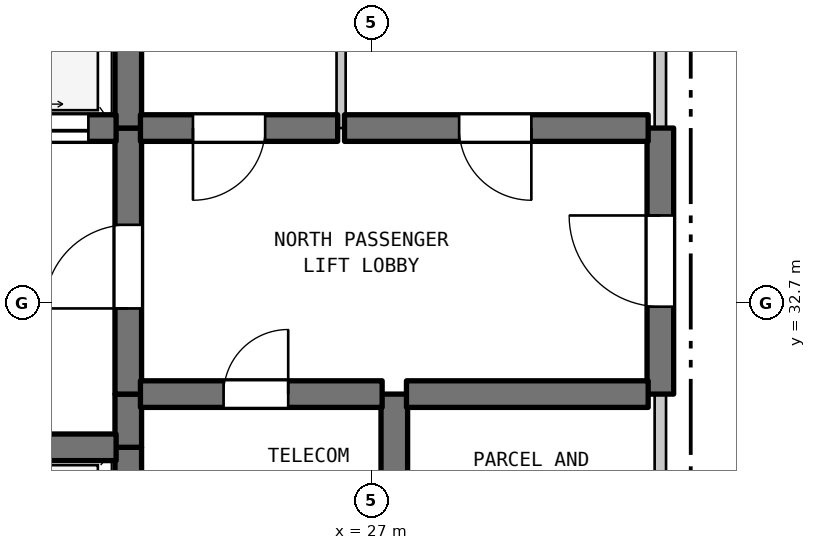
"""IFC4 building model, lengths in metres.
Left out: names, types, materials, properties, quantities, classifications, styles, units other than length and angle.
Written with IfcOpenShell. Run it as: python <this file> out.ifc"""

import sys

from ifc_helpers import new_model, si_unit, direction, frame, frame_2d, origin, place, context, subcontext, project, spatial, rectangle, extrude, element, fill, save


model = new_model("IFC4")
c1 = context("Model", 3, precision=1e-05, world=origin(), true_north=direction((0.0, 1.0)))
c2 = subcontext(c1, "Body", "Model", "MODEL_VIEW")
j1 = project(units=[si_unit("LENGTHUNIT", "METRE"), si_unit("PLANEANGLEUNIT", "RADIAN")], contexts=[c1])
p1 = place(None, origin())
s1 = spatial("IfcSite", under=j1, at=p1, CompositionType="ELEMENT")
p2 = place(p1, origin())
s2 = spatial("IfcBuilding", under=s1, at=p2, CompositionType="ELEMENT")
p3 = place(p2, frame((0.0, 0.0, 262.1)))
s3 = spatial("IfcBuildingStorey", under=s2, at=p3, CompositionType="ELEMENT", Elevation=262.1)
p4 = place(p3, frame((23.8, 28.2, 0.0), z_axis=(0.0, 0.0, 1.0), x_axis=(0.0, 1.0, 0.0)))
e1 = element("IfcWall", 1, at=p4, inside=s3, PredefinedType="SHEAR", context=c2, shape_type="SweptSolid", body=[
    extrude(rectangle(XDim=2.6, YDim=0.35, at=frame_2d((1.3, 0.0))), origin(), (0.0, 0.0, 1.0), 3.39),
])
p5 = place(p3, frame((23.8, 30.8, 0.0), z_axis=(0.0, 0.0, 1.0), x_axis=(0.0, 1.0, 0.0)))
e2 = element("IfcWall", 2, at=p5, inside=s3, PredefinedType="SHEAR", context=c2, shape_type="SweptSolid", body=[
    extrude(rectangle(XDim=0.7, YDim=0.35, at=frame_2d((0.35, 0.0))), origin(), (0.0, 0.0, 1.0), 3.39),
])
p6 = place(p3, frame((23.8, 31.5, 0.0), z_axis=(0.0, 0.0, 1.0), x_axis=(0.0, 1.0, 0.0)))
e3 = element("IfcWall", 3, at=p6, inside=s3, PredefinedType="SHEAR", context=c2, shape_type="SweptSolid", body=[
    extrude(rectangle(XDim=3.5, YDim=0.35, at=frame_2d((1.75, 0.0))), origin(), (0.0, 0.0, 1.0), 3.39),
])
p7 = place(p6, frame((1.127, 0.0, 0.0)))
e4 = element("IfcOpeningElement", 4, at=p7, cuts=e3, PredefinedType="OPENING", context=c2, shape_type="SweptSolid", body=[
    extrude(rectangle(XDim=1.1, YDim=2.15, at=frame_2d((0.55, 1.075))), frame((0.0, 0.185, 0.0), z_axis=(0.0, -1.0, 0.0), x_axis=(1.0, 0.0, 0.0)), (0.0, 0.0, 1.0), 0.37),
])
p8 = place(p3, frame((23.8, 35.0, 0.0), z_axis=(0.0, 0.0, 1.0), x_axis=(0.0, 1.0, 0.0)))
e5 = element("IfcWall", 5, at=p8, inside=s3, PredefinedType="SHEAR", context=c2, shape_type="SweptSolid", body=[
    extrude(rectangle(XDim=2.9, YDim=0.35, at=frame_2d((1.45, 0.0))), origin(), (0.0, 0.0, 1.0), 3.39),
])
p9 = place(p3, frame((26.6, 35.0, 0.0), z_axis=(0.0, 0.0, 1.0), x_axis=(0.0, 1.0, 0.0)))
e6 = element("IfcWall", 6, at=p9, inside=s3, PredefinedType="PARTITIONING", context=c2, shape_type="SweptSolid", body=[
    extrude(rectangle(XDim=2.9, YDim=0.12, at=frame_2d((1.45, 0.0))), origin(), (0.0, 0.0, 1.0), 3.39),
])
p10 = place(p3, frame((27.3, 28.9, 0.0), z_axis=(0.0, 0.0, 1.0), x_axis=(0.0, 1.0, 0.0)))
e7 = element("IfcWall", 7, at=p10, inside=s3, PredefinedType="SHEAR", context=c2, shape_type="SweptSolid", body=[
    extrude(rectangle(XDim=2.6, YDim=0.35, at=frame_2d((1.3, 0.0))), origin(), (0.0, 0.0, 1.0), 3.39),
])
p11 = place(p3, frame((30.8, 28.9, 0.0), z_axis=(0.0, 0.0, 1.0), x_axis=(0.0, 1.0, 0.0)))
e8 = element("IfcWall", 8, at=p11, inside=s3, PredefinedType="STANDARD", context=c2, shape_type="SweptSolid", body=[
    extrude(rectangle(XDim=2.6, YDim=0.15, at=frame_2d((1.3, 0.0))), origin(), (0.0, 0.0, 1.0), 3.39),
])
p12 = place(p3, frame((30.8, 31.5, 0.0), z_axis=(0.0, 0.0, 1.0), x_axis=(0.0, 1.0, 0.0)))
e9 = element("IfcWall", 9, at=p12, inside=s3, PredefinedType="SHEAR", context=c2, shape_type="SweptSolid", body=[
    extrude(rectangle(XDim=3.5, YDim=0.35, at=frame_2d((1.75, 0.0))), origin(), (0.0, 0.0, 1.0), 3.39),
])
p13 = place(p12, frame((1.15, 0.0, 0.0)))
e10 = element("IfcOpeningElement", 10, at=p13, cuts=e9, PredefinedType="OPENING", context=c2, shape_type="SweptSolid", body=[
    extrude(rectangle(XDim=1.2, YDim=2.2, at=frame_2d((0.6, 1.1))), frame((0.0, 0.185, 0.0), z_axis=(0.0, -1.0, 0.0), x_axis=(1.0, 0.0, 0.0)), (0.0, 0.0, 1.0), 0.37),
])
p14 = place(p3, frame((30.8, 35.0, 0.0), z_axis=(0.0, 0.0, 1.0), x_axis=(0.0, 1.0, 0.0)))
e11 = element("IfcWall", 11, at=p14, inside=s3, PredefinedType="STANDARD", context=c2, shape_type="SweptSolid", body=[
    extrude(rectangle(XDim=2.9, YDim=0.15, at=frame_2d((1.45, 0.0))), origin(), (0.0, 0.0, 1.0), 3.39),
])
p15 = place(p3, frame((19.16, 30.8, 0.0), z_axis=(0.0, 0.0, 1.0), x_axis=(1.0, 0.0, 0.0)))
e12 = element("IfcWall", 12, at=p15, inside=s3, PredefinedType="SHEAR", context=c2, shape_type="SweptSolid", body=[
    extrude(rectangle(XDim=4.48, YDim=0.35, at=frame_2d((2.24, 0.0))), origin(), (0.0, 0.0, 1.0), 3.39),
])
p16 = place(p3, frame((23.96, 31.5, 0.0), z_axis=(0.0, 0.0, 1.0), x_axis=(1.0, 0.0, 0.0)))
e13 = element("IfcWall", 13, at=p16, inside=s3, PredefinedType="SHEAR", context=c2, shape_type="SweptSolid", body=[
    extrude(rectangle(XDim=3.18, YDim=0.35, at=frame_2d((1.59, 0.0))), origin(), (0.0, 0.0, 1.0), 3.39),
])
p17 = place(p16, frame((1.094, 0.0, 0.0)))
e14 = element("IfcOpeningElement", 14, at=p17, cuts=e13, PredefinedType="OPENING", context=c2, shape_type="SweptSolid", body=[
    extrude(rectangle(XDim=0.85, YDim=2.1, at=frame_2d((0.425, 1.05))), frame((0.0, 0.185, 0.0), z_axis=(0.0, -1.0, 0.0), x_axis=(1.0, 0.0, 0.0)), (0.0, 0.0, 1.0), 0.37),
])
p18 = place(p3, frame((27.46, 31.5, 0.0), z_axis=(0.0, 0.0, 1.0), x_axis=(1.0, 0.0, 0.0)))
e15 = element("IfcWall", 15, at=p18, inside=s3, PredefinedType="SHEAR", context=c2, shape_type="SweptSolid", body=[
    extrude(rectangle(XDim=3.18, YDim=0.35, at=frame_2d((1.59, 0.0))), origin(), (0.0, 0.0, 1.0), 3.39),
])
p19 = place(p3, frame((19.16, 35.0, 0.0), z_axis=(0.0, 0.0, 1.0), x_axis=(1.0, 0.0, 0.0)))
e16 = element("IfcWall", 16, at=p19, inside=s3, PredefinedType="SHEAR", context=c2, shape_type="SweptSolid", body=[
    extrude(rectangle(XDim=4.48, YDim=0.35, at=frame_2d((2.24, 0.0))), origin(), (0.0, 0.0, 1.0), 3.39),
])
p20 = place(p19, frame((0.365, 0.0, 0.0)))
e17 = element("IfcOpeningElement", 17, at=p20, cuts=e16, PredefinedType="OPENING", context=c2, shape_type="SweptSolid", body=[
    extrude(rectangle(XDim=1.35, YDim=2.2, at=frame_2d((0.675, 1.1))), frame((0.0, 0.185, 0.0), z_axis=(0.0, -1.0, 0.0), x_axis=(1.0, 0.0, 0.0)), (0.0, 0.0, 1.0), 0.37),
])
p21 = place(p19, frame((2.765, 0.0, 0.0)))
e18 = element("IfcOpeningElement", 18, at=p21, cuts=e16, PredefinedType="OPENING", context=c2, shape_type="SweptSolid", body=[
    extrude(rectangle(XDim=1.35, YDim=2.2, at=frame_2d((0.675, 1.1))), frame((0.0, 0.185, 0.0), z_axis=(0.0, -1.0, 0.0), x_axis=(1.0, 0.0, 0.0)), (0.0, 0.0, 1.0), 0.37),
])
p22 = place(p3, frame((23.96, 35.0, 0.0), z_axis=(0.0, 0.0, 1.0), x_axis=(1.0, 0.0, 0.0)))
e19 = element("IfcWall", 19, at=p22, inside=s3, PredefinedType="SHEAR", context=c2, shape_type="SweptSolid", body=[
    extrude(rectangle(XDim=2.595, YDim=0.35, at=frame_2d((1.297, 0.0))), origin(), (0.0, 0.0, 1.0), 3.39),
])
p23 = place(p22, frame((0.691, 0.0, 0.0)))
e20 = element("IfcOpeningElement", 20, at=p23, cuts=e19, PredefinedType="OPENING", context=c2, shape_type="SweptSolid", body=[
    extrude(rectangle(XDim=0.95, YDim=2.15, at=frame_2d((0.475, 1.075))), frame((0.0, 0.185, 0.0), z_axis=(0.0, -1.0, 0.0), x_axis=(1.0, 0.0, 0.0)), (0.0, 0.0, 1.0), 0.37),
])
p24 = place(p3, frame((26.645, 35.0, 0.0), z_axis=(0.0, 0.0, 1.0), x_axis=(1.0, 0.0, 0.0)))
e21 = element("IfcWall", 21, at=p24, inside=s3, PredefinedType="SHEAR", context=c2, shape_type="SweptSolid", body=[
    extrude(rectangle(XDim=3.995, YDim=0.35, at=frame_2d((1.998, 0.0))), origin(), (0.0, 0.0, 1.0), 3.39),
])
p25 = place(p24, frame((1.508, 0.0, 0.0)))
e22 = element("IfcOpeningElement", 22, at=p25, cuts=e21, PredefinedType="OPENING", context=c2, shape_type="SweptSolid", body=[
    extrude(rectangle(XDim=0.95, YDim=2.15, at=frame_2d((0.475, 1.075))), frame((0.0, 0.185, 0.0), z_axis=(0.0, -1.0, 0.0), x_axis=(1.0, 0.0, 0.0)), (0.0, 0.0, 1.0), 0.37),
])
p26 = place(p7, origin())
e23 = element("IfcDoor", 23, at=p26, inside=s3, OperationType="SINGLE_SWING_LEFT", PredefinedType="DOOR", context=c2, shape_type="SweptSolid", body=[
    extrude(rectangle(XDim=1.1, YDim=2.15, at=frame_2d((0.55, 1.075))), frame((0.0, 0.025, 0.0), z_axis=(0.0, -1.0, 0.0), x_axis=(1.0, 0.0, 0.0)), (0.0, 0.0, 1.0), 0.05),
])
fill(e4, e23)
p27 = place(p13, origin())
e24 = element("IfcDoor", 24, at=p27, inside=s3, OperationType="SINGLE_SWING_RIGHT", PredefinedType="DOOR", context=c2, shape_type="SweptSolid", body=[
    extrude(rectangle(XDim=1.2, YDim=2.2, at=frame_2d((0.6, 1.1))), frame((0.0, 0.025, 0.0), z_axis=(0.0, -1.0, 0.0), x_axis=(1.0, 0.0, 0.0)), (0.0, 0.0, 1.0), 0.05),
])
fill(e10, e24)
p28 = place(p17, origin())
e25 = element("IfcDoor", 25, at=p28, inside=s3, OperationType="SINGLE_SWING_RIGHT", PredefinedType="DOOR", context=c2, shape_type="SweptSolid", body=[
    extrude(rectangle(XDim=0.85, YDim=2.1, at=frame_2d((0.425, 1.05))), frame((0.0, 0.025, 0.0), z_axis=(0.0, -1.0, 0.0), x_axis=(1.0, 0.0, 0.0)), (0.0, 0.0, 1.0), 0.05),
])
fill(e14, e25)
p29 = place(p21, origin())
e26 = element("IfcDoor", 26, at=p29, inside=s3, OperationType="DOUBLE_DOOR_SLIDING", PredefinedType="DOOR", context=c2, shape_type="SweptSolid", body=[
    extrude(rectangle(XDim=1.35, YDim=2.2, at=frame_2d((0.675, 1.1))), frame((0.0, 0.025, 0.0), z_axis=(0.0, -1.0, 0.0), x_axis=(1.0, 0.0, 0.0)), (0.0, 0.0, 1.0), 0.05),
])
fill(e18, e26)
p30 = place(p23, frame((0.95, 0.0, 0.0), z_axis=(0.0, 0.0, 1.0), x_axis=(-1.0, 0.0, 0.0)))
e27 = element("IfcDoor", 27, at=p30, inside=s3, OperationType="SINGLE_SWING_LEFT", PredefinedType="DOOR", context=c2, shape_type="SweptSolid", body=[
    extrude(rectangle(XDim=0.95, YDim=2.15, at=frame_2d((0.475, 1.075))), frame((0.0, 0.025, 0.0), z_axis=(0.0, -1.0, 0.0), x_axis=(1.0, 0.0, 0.0)), (0.0, 0.0, 1.0), 0.05),
])
fill(e20, e27)
p31 = place(p25, frame((0.95, 0.0, 0.0), z_axis=(0.0, 0.0, 1.0), x_axis=(-1.0, 0.0, 0.0)))
e28 = element("IfcDoor", 28, at=p31, inside=s3, OperationType="SINGLE_SWING_RIGHT", PredefinedType="DOOR", context=c2, shape_type="SweptSolid", body=[
    extrude(rectangle(XDim=0.95, YDim=2.15, at=frame_2d((0.475, 1.075))), frame((0.0, 0.025, 0.0), z_axis=(0.0, -1.0, 0.0), x_axis=(1.0, 0.0, 0.0)), (0.0, 0.0, 1.0), 0.05),
])
fill(e22, e28)
save(model, sys.argv[1])
